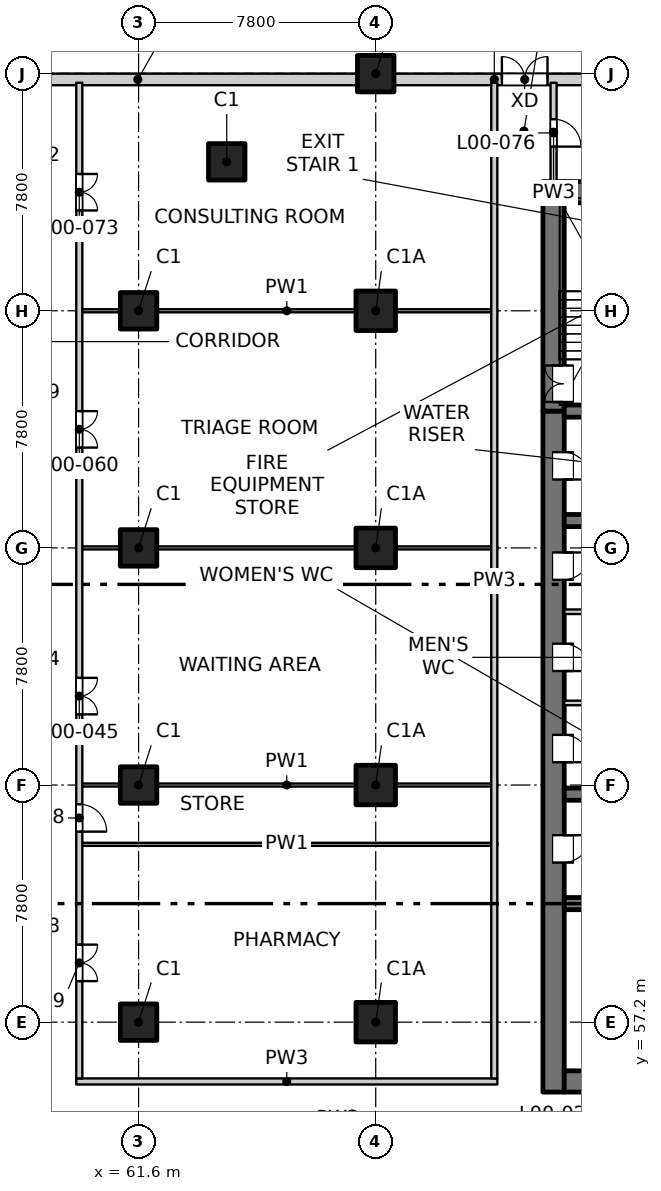
"""IFC4 building model, lengths in metres.
Left out: names, types, materials, properties, quantities, classifications, styles, units other than length and angle.
Written with IfcOpenShell. Run it as: python <this file> out.ifc"""

import sys

from ifc_helpers import new_model, si_unit, direction, frame, frame_2d, origin, origin_2d, place, context, subcontext, project, spatial, rectangle, extrude, element, fill, save


model = new_model("IFC4")
c1 = context("Model", 3, precision=1e-05, world=origin(), true_north=direction((0.0, 1.0)))
c2 = subcontext(c1, "Body", "Model", "MODEL_VIEW")
j1 = project(units=[si_unit("LENGTHUNIT", "METRE"), si_unit("PLANEANGLEUNIT", "RADIAN")], contexts=[c1])
p1 = place(None, origin())
s1 = spatial("IfcSite", under=j1, at=p1, CompositionType="ELEMENT")
p2 = place(p1, origin())
s2 = spatial("IfcBuilding", under=s1, at=p2, CompositionType="ELEMENT")
p3 = place(p2, origin())
s3 = spatial("IfcBuildingStorey", under=s2, at=p3, CompositionType="ELEMENT", Elevation=0.0)
for number, where, z_axis, x_axis in (
    (1, (64.5, 85.5, -0.4), (0.0, 0.0, 1.0), (1.0, 0.0, 0.0)),
    (2, (69.4, 88.4, -0.4), (0.0, 0.0, 1.0), (1.0, 0.0, 0.0)),
    (3, (61.6, 57.2, -0.4), (0.0, 0.0, 1.0), (1.0, 0.0, 0.0)),
    (4, (61.6, 65.0, -0.4), (0.0, 0.0, 1.0), (1.0, 0.0, 0.0)),
    (5, (61.6, 72.8, -0.4), (0.0, 0.0, 1.0), (1.0, 0.0, 0.0)),
    (6, (61.6, 80.6, -0.4), (0.0, 0.0, 1.0), (1.0, 0.0, 0.0)),
):
    element("IfcColumn", number, at=place(p3, frame(where, z_axis=z_axis, x_axis=x_axis)), inside=s3, PredefinedType="COLUMN", context=c2, shape_type="SweptSolid", body=[
        extrude(rectangle(XDim=1.2, YDim=1.2, at=origin_2d()), origin(), (0.0, 0.0, 1.0), 6.1),
    ])
for number, where, z_axis, x_axis in (
    (7, (69.4, 57.2, -0.4), (0.0, 0.0, 1.0), (1.0, 0.0, 0.0)),
    (8, (69.4, 65.0, -0.4), (0.0, 0.0, 1.0), (1.0, 0.0, 0.0)),
    (9, (69.4, 72.8, -0.4), (0.0, 0.0, 1.0), (1.0, 0.0, 0.0)),
    (10, (69.4, 80.6, -0.4), (0.0, 0.0, 1.0), (1.0, 0.0, 0.0)),
):
    element("IfcColumn", number, at=place(p3, frame(where, z_axis=z_axis, x_axis=x_axis)), inside=s3, PredefinedType="COLUMN", context=c2, shape_type="SweptSolid", body=[
        extrude(rectangle(XDim=1.3, YDim=1.3, at=origin_2d()), origin(), (0.0, 0.0, 1.0), 6.1),
    ])
p4 = place(p3, frame((75.25, 54.9, -0.4), z_axis=(0.0, 0.0, 1.0), x_axis=(0.0, 1.0, 0.0)))
e11 = element("IfcWall", 11, at=p4, inside=s3, PredefinedType="SOLIDWALL", context=c2, shape_type="SweptSolid", body=[
    extrude(rectangle(XDim=22.4, YDim=0.7, at=frame_2d((11.2, 0.0))), origin(), (0.0, 0.0, 1.0), 6.1),
])
p5 = place(p4, frame((7.55, 0.0, 0.4)))
e12 = element("IfcOpeningElement", 12, at=p5, cuts=e11, PredefinedType="OPENING", context=c2, shape_type="SweptSolid", body=[
    extrude(rectangle(XDim=0.9, YDim=2.1, at=frame_2d((0.45, 1.05))), frame((0.0, 0.36, 0.0), z_axis=(0.0, -1.0, 0.0), x_axis=(1.0, 0.0, 0.0)), (0.0, 0.0, 1.0), 0.72),
])
p6 = place(p4, frame((10.85, 0.0, 0.4)))
e13 = element("IfcOpeningElement", 13, at=p6, cuts=e11, PredefinedType="OPENING", context=c2, shape_type="SweptSolid", body=[
    extrude(rectangle(XDim=0.9, YDim=2.1, at=frame_2d((0.45, 1.05))), frame((0.0, 0.36, 0.0), z_axis=(0.0, -1.0, 0.0), x_axis=(1.0, 0.0, 0.0)), (0.0, 0.0, 1.0), 0.72),
])
p7 = place(p4, frame((13.85, 0.0, 0.4)))
e14 = element("IfcOpeningElement", 14, at=p7, cuts=e11, PredefinedType="OPENING", context=c2, shape_type="SweptSolid", body=[
    extrude(rectangle(XDim=0.9, YDim=2.1, at=frame_2d((0.45, 1.05))), frame((0.0, 0.36, 0.0), z_axis=(0.0, -1.0, 0.0), x_axis=(1.0, 0.0, 0.0)), (0.0, 0.0, 1.0), 0.72),
])
p8 = place(p4, frame((16.85, 0.0, 0.4)))
e15 = element("IfcOpeningElement", 15, at=p8, cuts=e11, PredefinedType="OPENING", context=c2, shape_type="SweptSolid", body=[
    extrude(rectangle(XDim=0.9, YDim=2.1, at=frame_2d((0.45, 1.05))), frame((0.0, 0.36, 0.0), z_axis=(0.0, -1.0, 0.0), x_axis=(1.0, 0.0, 0.0)), (0.0, 0.0, 1.0), 0.72),
])
p9 = place(p4, frame((20.15, 0.0, 0.4)))
e16 = element("IfcOpeningElement", 16, at=p9, cuts=e11, PredefinedType="OPENING", context=c2, shape_type="SweptSolid", body=[
    extrude(rectangle(XDim=0.9, YDim=2.1, at=frame_2d((0.45, 1.05))), frame((0.0, 0.36, 0.0), z_axis=(0.0, -1.0, 0.0), x_axis=(1.0, 0.0, 0.0)), (0.0, 0.0, 1.0), 0.72),
])
p10 = place(p3, frame((75.25, 77.3, -0.4), z_axis=(0.0, 0.0, 1.0), x_axis=(0.0, 1.0, 0.0)))
e17 = element("IfcWall", 17, at=p10, inside=s3, PredefinedType="SOLIDWALL", context=c2, shape_type="SweptSolid", body=[
    extrude(rectangle(XDim=7.55, YDim=0.7, at=frame_2d((3.775, 0.0))), origin(), (0.0, 0.0, 1.0), 6.1),
])
p11 = place(p10, frame((0.3, 0.0, 0.4)))
e18 = element("IfcOpeningElement", 18, at=p11, cuts=e17, PredefinedType="OPENING", context=c2, shape_type="SweptSolid", body=[
    extrude(rectangle(XDim=1.2, YDim=2.1, at=frame_2d((0.6, 1.05))), frame((0.0, 0.36, 0.0), z_axis=(0.0, -1.0, 0.0), x_axis=(1.0, 0.0, 0.0)), (0.0, 0.0, 1.0), 0.72),
])
p12 = place(p3, frame((75.6, 55.25, -0.4), z_axis=(0.0, 0.0, 1.0), x_axis=(1.0, 0.0, 0.0)))
e19 = element("IfcWall", 19, at=p12, inside=s3, PredefinedType="SOLIDWALL", context=c2, shape_type="SweptSolid", body=[
    extrude(rectangle(XDim=18.8, YDim=0.7, at=frame_2d((9.4, 0.0))), origin(), (0.0, 0.0, 1.0), 6.1),
])
p13 = place(p12, frame((8.65, 0.0, 0.4)))
e20 = element("IfcOpeningElement", 20, at=p13, cuts=e19, PredefinedType="OPENING", context=c2, shape_type="SweptSolid", body=[
    extrude(rectangle(XDim=1.5, YDim=2.1, at=frame_2d((0.75, 1.05))), frame((0.0, 0.36, 0.0), z_axis=(0.0, -1.0, 0.0), x_axis=(1.0, 0.0, 0.0)), (0.0, 0.0, 1.0), 0.72),
])
p14 = place(p3, frame((75.6, 84.5, -0.4), z_axis=(0.0, 0.0, 1.0), x_axis=(1.0, 0.0, 0.0)))
e21 = element("IfcWall", 21, at=p14, inside=s3, PredefinedType="SOLIDWALL", context=c2, shape_type="SweptSolid", body=[
    extrude(rectangle(XDim=18.8, YDim=0.7, at=frame_2d((9.4, 0.0))), origin(), (0.0, 0.0, 1.0), 6.1),
])
for number, where, z_axis, x_axis in (
    (22, (75.6, 61.1, -0.4), (0.0, 0.0, 1.0), (1.0, 0.0, 0.0)),
    (23, (75.6, 64.7, -0.4), (0.0, 0.0, 1.0), (1.0, 0.0, 0.0)),
    (24, (75.6, 73.7, -0.4), (0.0, 0.0, 1.0), (1.0, 0.0, 0.0)),
    (25, (75.6, 77.3, -0.4), (0.0, 0.0, 1.0), (1.0, 0.0, 0.0)),
):
    element("IfcWall", number, at=place(p3, frame(where, z_axis=z_axis, x_axis=x_axis)), inside=s3, PredefinedType="SOLIDWALL", context=c2, shape_type="SweptSolid", body=[
        extrude(rectangle(XDim=3.65, YDim=0.4, at=frame_2d((1.825, 0.0))), origin(), (0.0, 0.0, 1.0), 6.1),
    ])
p15 = place(p3, frame((54.35, 88.21, 0.0), z_axis=(0.0, 0.0, 1.0), x_axis=(1.0, 0.0, 0.0)))
e26 = element("IfcWall", 26, at=p15, inside=s3, PredefinedType="SOLIDWALL", context=c2, shape_type="SweptSolid", body=[
    extrude(rectangle(XDim=14.45, YDim=0.38, at=frame_2d((7.225, 0.0))), origin(), (0.0, 0.0, 1.0), 5.7),
])
p16 = place(p3, frame((70.0, 88.21, 0.0), z_axis=(0.0, 0.0, 1.0), x_axis=(1.0, 0.0, 0.0)))
e27 = element("IfcWall", 27, at=p16, inside=s3, PredefinedType="SOLIDWALL", context=c2, shape_type="SweptSolid", body=[
    extrude(rectangle(XDim=6.6, YDim=0.38, at=frame_2d((3.3, 0.0))), origin(), (0.0, 0.0, 1.0), 5.7),
])
p17 = place(p16, frame((3.55, 0.0, 0.0)))
e28 = element("IfcOpeningElement", 28, at=p17, cuts=e27, PredefinedType="OPENING", context=c2, shape_type="SweptSolid", body=[
    extrude(rectangle(XDim=1.5, YDim=2.4, at=frame_2d((0.75, 1.2))), frame((0.0, 0.2, 0.0), z_axis=(0.0, -1.0, 0.0), x_axis=(1.0, 0.0, 0.0)), (0.0, 0.0, 1.0), 0.4),
])
p18 = place(p3, frame((59.55, 55.25, 0.0), z_axis=(0.0, 0.0, 1.0), x_axis=(1.0, 0.0, 0.0)))
e29 = element("IfcWall", 29, at=p18, inside=s3, PredefinedType="PARTITIONING", context=c2, shape_type="SweptSolid", body=[
    extrude(rectangle(XDim=13.85, YDim=0.2, at=frame_2d((6.925, 0.0))), origin(), (0.0, 0.0, 1.0), 5.7),
])
for number, where, z_axis, x_axis in (
    (30, (59.55, 63.05, 0.0), (0.0, 0.0, 1.0), (1.0, 0.0, 0.0)),
    (31, (59.55, 65.0, 0.0), (0.0, 0.0, 1.0), (1.0, 0.0, 0.0)),
):
    element("IfcWall", number, at=place(p3, frame(where, z_axis=z_axis, x_axis=x_axis)), inside=s3, PredefinedType="PARTITIONING", context=c2, shape_type="SweptSolid", body=[
        extrude(rectangle(XDim=13.85, YDim=0.1, at=frame_2d((6.925, 0.0))), origin(), (0.0, 0.0, 1.0), 5.7),
    ])
for number, where, z_axis, x_axis in (
    (32, (75.6, 67.7, 0.0), (0.0, 0.0, 1.0), (1.0, 0.0, 0.0)),
    (33, (75.6, 70.7, 0.0), (0.0, 0.0, 1.0), (1.0, 0.0, 0.0)),
):
    element("IfcWall", number, at=place(p3, frame(where, z_axis=z_axis, x_axis=x_axis)), inside=s3, PredefinedType="PARTITIONING", context=c2, shape_type="SweptSolid", body=[
        extrude(rectangle(XDim=3.65, YDim=0.15, at=frame_2d((1.825, 0.0))), origin(), (0.0, 0.0, 1.0), 5.7),
    ])
for number, where, z_axis, x_axis in (
    (34, (59.55, 72.8, 0.0), (0.0, 0.0, 1.0), (1.0, 0.0, 0.0)),
    (35, (59.55, 80.6, 0.0), (0.0, 0.0, 1.0), (1.0, 0.0, 0.0)),
):
    element("IfcWall", number, at=place(p3, frame(where, z_axis=z_axis, x_axis=x_axis)), inside=s3, PredefinedType="PARTITIONING", context=c2, shape_type="SweptSolid", body=[
        extrude(rectangle(XDim=13.85, YDim=0.1, at=frame_2d((6.925, 0.0))), origin(), (0.0, 0.0, 1.0), 5.7),
    ])
p19 = place(p3, frame((59.65, 55.35, 0.0), z_axis=(0.0, 0.0, 1.0), x_axis=(0.0, 1.0, 0.0)))
e36 = element("IfcWall", 36, at=p19, inside=s3, PredefinedType="PARTITIONING", context=c2, shape_type="SweptSolid", body=[
    extrude(rectangle(XDim=32.75, YDim=0.2, at=frame_2d((16.375, 0.0))), origin(), (0.0, 0.0, 1.0), 5.7),
])
p20 = place(p19, frame((3.2, 0.0, 0.0)))
e37 = element("IfcOpeningElement", 37, at=p20, cuts=e36, PredefinedType="OPENING", context=c2, shape_type="SweptSolid", body=[
    extrude(rectangle(XDim=1.2, YDim=2.1, at=frame_2d((0.6, 1.05))), frame((0.0, 0.11, 0.0), z_axis=(0.0, -1.0, 0.0), x_axis=(1.0, 0.0, 0.0)), (0.0, 0.0, 1.0), 0.22),
])
p21 = place(p19, frame((8.117, 0.0, 0.0)))
e38 = element("IfcOpeningElement", 38, at=p21, cuts=e36, PredefinedType="OPENING", context=c2, shape_type="SweptSolid", body=[
    extrude(rectangle(XDim=0.9, YDim=2.1, at=frame_2d((0.45, 1.05))), frame((0.0, 0.11, 0.0), z_axis=(0.0, -1.0, 0.0), x_axis=(1.0, 0.0, 0.0)), (0.0, 0.0, 1.0), 0.22),
])
p22 = place(p19, frame((11.975, 0.0, 0.0)))
e39 = element("IfcOpeningElement", 39, at=p22, cuts=e36, PredefinedType="OPENING", context=c2, shape_type="SweptSolid", body=[
    extrude(rectangle(XDim=1.2, YDim=2.1, at=frame_2d((0.6, 1.05))), frame((0.0, 0.11, 0.0), z_axis=(0.0, -1.0, 0.0), x_axis=(1.0, 0.0, 0.0)), (0.0, 0.0, 1.0), 0.22),
])
p23 = place(p19, frame((20.75, 0.0, 0.0)))
e40 = element("IfcOpeningElement", 40, at=p23, cuts=e36, PredefinedType="OPENING", context=c2, shape_type="SweptSolid", body=[
    extrude(rectangle(XDim=1.2, YDim=2.1, at=frame_2d((0.6, 1.05))), frame((0.0, 0.11, 0.0), z_axis=(0.0, -1.0, 0.0), x_axis=(1.0, 0.0, 0.0)), (0.0, 0.0, 1.0), 0.22),
])
p24 = place(p19, frame((28.55, 0.0, 0.0)))
e41 = element("IfcOpeningElement", 41, at=p24, cuts=e36, PredefinedType="OPENING", context=c2, shape_type="SweptSolid", body=[
    extrude(rectangle(XDim=1.2, YDim=2.1, at=frame_2d((0.6, 1.05))), frame((0.0, 0.11, 0.0), z_axis=(0.0, -1.0, 0.0), x_axis=(1.0, 0.0, 0.0)), (0.0, 0.0, 1.0), 0.22),
])
p25 = place(p3, frame((73.3, 55.35, 0.0), z_axis=(0.0, 0.0, 1.0), x_axis=(0.0, 1.0, 0.0)))
e42 = element("IfcWall", 42, at=p25, inside=s3, PredefinedType="PARTITIONING", context=c2, shape_type="SweptSolid", body=[
    extrude(rectangle(XDim=32.75, YDim=0.2, at=frame_2d((16.375, 0.0))), origin(), (0.0, 0.0, 1.0), 5.7),
])
p26 = place(p3, frame((75.25, 84.85, 0.0), z_axis=(0.0, 0.0, 1.0), x_axis=(0.0, 1.0, 0.0)))
e43 = element("IfcWall", 43, at=p26, inside=s3, PredefinedType="PARTITIONING", context=c2, shape_type="SweptSolid", body=[
    extrude(rectangle(XDim=3.25, YDim=0.2, at=frame_2d((1.625, 0.0))), origin(), (0.0, 0.0, 1.0), 5.7),
])
p27 = place(p26, frame((1.15, 0.0, 0.0)))
e44 = element("IfcOpeningElement", 44, at=p27, cuts=e43, PredefinedType="OPENING", context=c2, shape_type="SweptSolid", body=[
    extrude(rectangle(XDim=0.9, YDim=2.1, at=frame_2d((0.45, 1.05))), frame((0.0, 0.11, 0.0), z_axis=(0.0, -1.0, 0.0), x_axis=(1.0, 0.0, 0.0)), (0.0, 0.0, 1.0), 0.22),
])
p28 = place(p17, origin())
e45 = element("IfcDoor", 45, at=p28, inside=s3, OperationType="DOUBLE_DOOR_SINGLE_SWING", PredefinedType="DOOR", context=c2, shape_type="SweptSolid", body=[
    extrude(rectangle(XDim=1.5, YDim=2.4, at=frame_2d((0.75, 1.2))), frame((0.0, 0.025, 0.0), z_axis=(0.0, -1.0, 0.0), x_axis=(1.0, 0.0, 0.0)), (0.0, 0.0, 1.0), 0.05),
])
fill(e28, e45)
p29 = place(p20, origin())
e46 = element("IfcDoor", 46, at=p29, inside=s3, OperationType="DOUBLE_DOOR_SINGLE_SWING", PredefinedType="DOOR", context=c2, shape_type="SweptSolid", body=[
    extrude(rectangle(XDim=1.2, YDim=2.1, at=frame_2d((0.6, 1.05))), frame((0.0, 0.025, 0.0), z_axis=(0.0, -1.0, 0.0), x_axis=(1.0, 0.0, 0.0)), (0.0, 0.0, 1.0), 0.05),
])
fill(e37, e46)
p30 = place(p5, origin())
e47 = element("IfcDoor", 47, at=p30, inside=s3, OperationType="SINGLE_SWING_LEFT", PredefinedType="DOOR", context=c2, shape_type="SweptSolid", body=[
    extrude(rectangle(XDim=0.9, YDim=2.1, at=frame_2d((0.45, 1.05))), frame((0.0, -0.285, 0.0), z_axis=(0.0, -1.0, 0.0), x_axis=(1.0, 0.0, 0.0)), (0.0, 0.0, 1.0), 0.05),
])
fill(e12, e47)
p31 = place(p21, origin())
e48 = element("IfcDoor", 48, at=p31, inside=s3, OperationType="SINGLE_SWING_RIGHT", PredefinedType="DOOR", context=c2, shape_type="SweptSolid", body=[
    extrude(rectangle(XDim=0.9, YDim=2.1, at=frame_2d((0.45, 1.05))), frame((0.0, 0.025, 0.0), z_axis=(0.0, -1.0, 0.0), x_axis=(1.0, 0.0, 0.0)), (0.0, 0.0, 1.0), 0.05),
])
fill(e38, e48)
p32 = place(p6, origin())
e49 = element("IfcDoor", 49, at=p32, inside=s3, OperationType="SINGLE_SWING_RIGHT", PredefinedType="DOOR", context=c2, shape_type="SweptSolid", body=[
    extrude(rectangle(XDim=0.9, YDim=2.1, at=frame_2d((0.45, 1.05))), frame((0.0, -0.285, 0.0), z_axis=(0.0, -1.0, 0.0), x_axis=(1.0, 0.0, 0.0)), (0.0, 0.0, 1.0), 0.05),
])
fill(e13, e49)
p33 = place(p22, origin())
e50 = element("IfcDoor", 50, at=p33, inside=s3, OperationType="DOUBLE_DOOR_SINGLE_SWING", PredefinedType="DOOR", context=c2, shape_type="SweptSolid", body=[
    extrude(rectangle(XDim=1.2, YDim=2.1, at=frame_2d((0.6, 1.05))), frame((0.0, 0.025, 0.0), z_axis=(0.0, -1.0, 0.0), x_axis=(1.0, 0.0, 0.0)), (0.0, 0.0, 1.0), 0.05),
])
fill(e39, e50)
p34 = place(p7, origin())
e51 = element("IfcDoor", 51, at=p34, inside=s3, OperationType="SINGLE_SWING_RIGHT", PredefinedType="DOOR", context=c2, shape_type="SweptSolid", body=[
    extrude(rectangle(XDim=0.9, YDim=2.1, at=frame_2d((0.45, 1.05))), frame((0.0, -0.285, 0.0), z_axis=(0.0, -1.0, 0.0), x_axis=(1.0, 0.0, 0.0)), (0.0, 0.0, 1.0), 0.05),
])
fill(e14, e51)
p35 = place(p8, origin())
e52 = element("IfcDoor", 52, at=p35, inside=s3, OperationType="SINGLE_SWING_LEFT", PredefinedType="DOOR", context=c2, shape_type="SweptSolid", body=[
    extrude(rectangle(XDim=0.9, YDim=2.1, at=frame_2d((0.45, 1.05))), frame((0.0, -0.285, 0.0), z_axis=(0.0, -1.0, 0.0), x_axis=(1.0, 0.0, 0.0)), (0.0, 0.0, 1.0), 0.05),
])
fill(e15, e52)
p36 = place(p9, origin())
e53 = element("IfcDoor", 53, at=p36, inside=s3, OperationType="SINGLE_SWING_RIGHT", PredefinedType="DOOR", context=c2, shape_type="SweptSolid", body=[
    extrude(rectangle(XDim=0.9, YDim=2.1, at=frame_2d((0.45, 1.05))), frame((0.0, -0.285, 0.0), z_axis=(0.0, -1.0, 0.0), x_axis=(1.0, 0.0, 0.0)), (0.0, 0.0, 1.0), 0.05),
])
fill(e16, e53)
p37 = place(p23, origin())
e54 = element("IfcDoor", 54, at=p37, inside=s3, OperationType="DOUBLE_DOOR_SINGLE_SWING", PredefinedType="DOOR", context=c2, shape_type="SweptSolid", body=[
    extrude(rectangle(XDim=1.2, YDim=2.1, at=frame_2d((0.6, 1.05))), frame((0.0, 0.025, 0.0), z_axis=(0.0, -1.0, 0.0), x_axis=(1.0, 0.0, 0.0)), (0.0, 0.0, 1.0), 0.05),
])
fill(e40, e54)
p38 = place(p11, origin())
e55 = element("IfcDoor", 55, at=p38, inside=s3, OperationType="DOUBLE_DOOR_SINGLE_SWING", PredefinedType="DOOR", context=c2, shape_type="SweptSolid", body=[
    extrude(rectangle(XDim=1.2, YDim=2.1, at=frame_2d((0.6, 1.05))), frame((0.0, -0.285, 0.0), z_axis=(0.0, -1.0, 0.0), x_axis=(1.0, 0.0, 0.0)), (0.0, 0.0, 1.0), 0.05),
])
fill(e18, e55)
p39 = place(p24, origin())
e56 = element("IfcDoor", 56, at=p39, inside=s3, OperationType="DOUBLE_DOOR_SINGLE_SWING", PredefinedType="DOOR", context=c2, shape_type="SweptSolid", body=[
    extrude(rectangle(XDim=1.2, YDim=2.1, at=frame_2d((0.6, 1.05))), frame((0.0, 0.025, 0.0), z_axis=(0.0, -1.0, 0.0), x_axis=(1.0, 0.0, 0.0)), (0.0, 0.0, 1.0), 0.05),
])
fill(e41, e56)
p40 = place(p27, origin())
e57 = element("IfcDoor", 57, at=p40, inside=s3, OperationType="SINGLE_SWING_RIGHT", PredefinedType="DOOR", context=c2, shape_type="SweptSolid", body=[
    extrude(rectangle(XDim=0.9, YDim=2.1, at=frame_2d((0.45, 1.05))), frame((0.0, 0.025, 0.0), z_axis=(0.0, -1.0, 0.0), x_axis=(1.0, 0.0, 0.0)), (0.0, 0.0, 1.0), 0.05),
])
fill(e44, e57)
save(model, sys.argv[1])
